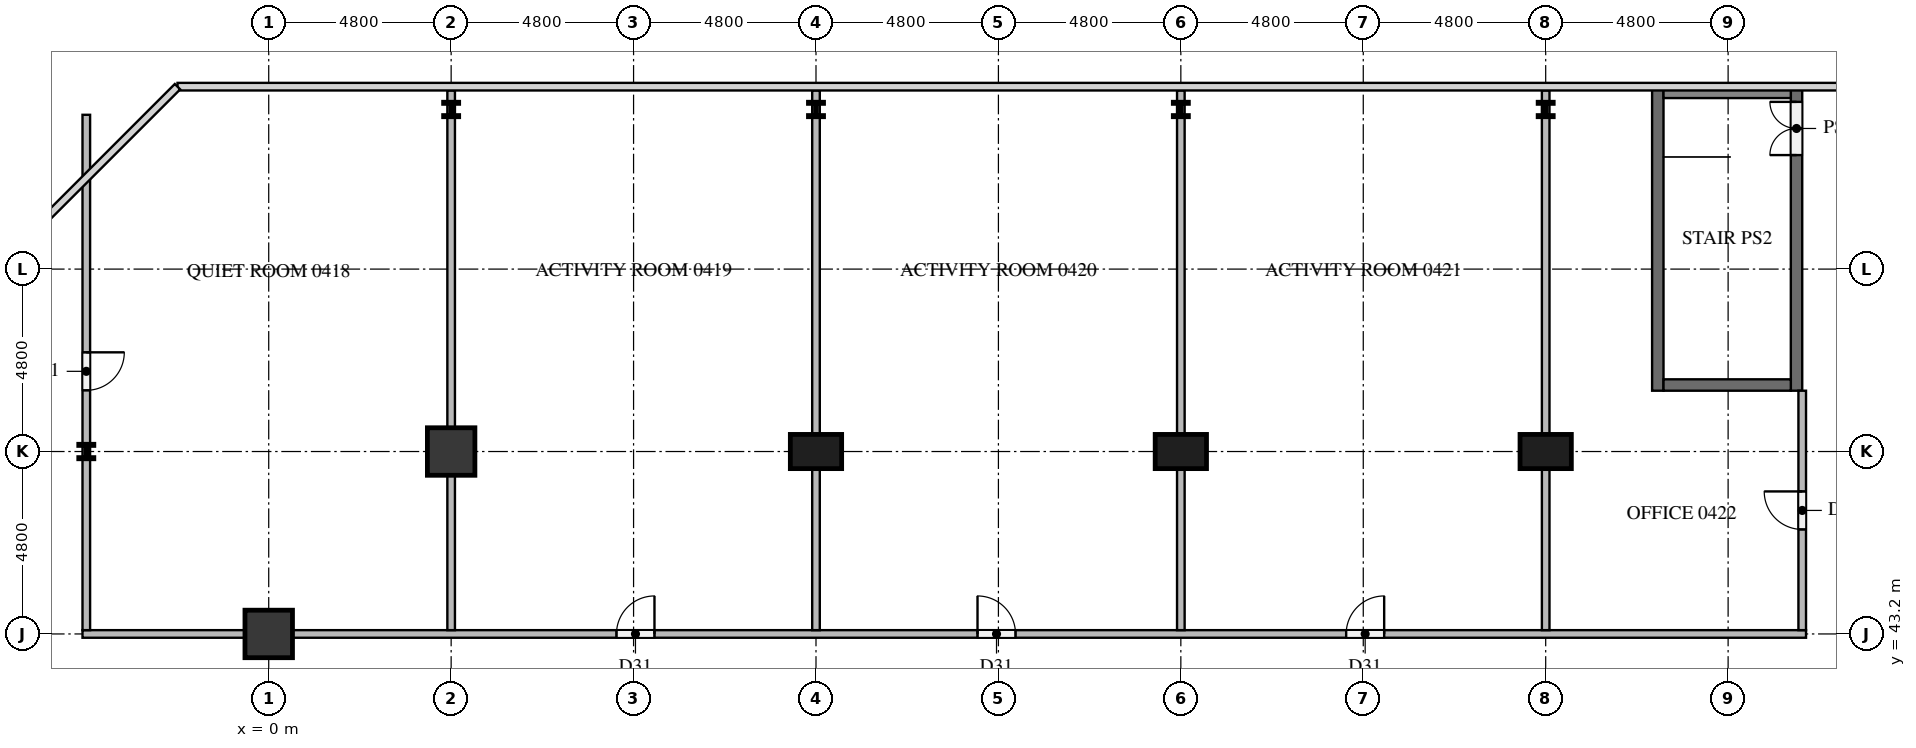
"""IFC4 building model, lengths in metres.
Left out: names, types, materials, properties, quantities, classifications, styles, units other than length and angle.
Written with IfcOpenShell. Run it as: python <this file> out.ifc"""

import sys

from ifc_helpers import new_model, si_unit, direction, frame, frame_2d, origin, origin_2d, place, context, subcontext, project, spatial, rectangle, i_section, extrude, element, fill, save


model = new_model("IFC4")
c1 = context("Model", 3, precision=1e-05, world=origin(), true_north=direction((0.0, 1.0)))
c2 = subcontext(c1, "Body", "Model", "MODEL_VIEW")
j1 = project(units=[si_unit("LENGTHUNIT", "METRE"), si_unit("PLANEANGLEUNIT", "RADIAN")], contexts=[c1])
p1 = place(None, origin())
s1 = spatial("IfcSite", under=j1, at=p1, CompositionType="ELEMENT")
p2 = place(p1, origin())
s2 = spatial("IfcBuilding", under=s1, at=p2, CompositionType="ELEMENT")
p3 = place(p2, frame((0.0, 0.0, 19.5)))
s3 = spatial("IfcBuildingStorey", under=s2, at=p3, CompositionType="ELEMENT", Elevation=19.5)
p4 = place(p3, frame((36.55, 49.6, 0.0), z_axis=(0.0, 0.0, 1.0), x_axis=(0.0, 1.0, 0.0)))
e1 = element("IfcWall", 1, at=p4, inside=s3, PredefinedType="SOLIDWALL", context=c2, shape_type="SweptSolid", body=[
    extrude(rectangle(XDim=8.0, YDim=0.3, at=frame_2d((4.0, 0.0))), origin(), (0.0, 0.0, 1.0), 4.1),
])
p5 = place(p3, frame((40.2, 49.6, 0.0), z_axis=(0.0, 0.0, 1.0), x_axis=(0.0, 1.0, 0.0)))
e2 = element("IfcWall", 2, at=p5, inside=s3, PredefinedType="SOLIDWALL", context=c2, shape_type="SweptSolid", body=[
    extrude(rectangle(XDim=8.0, YDim=0.3, at=frame_2d((4.0, 0.0))), origin(), (0.0, 0.0, 1.0), 4.1),
])
p6 = place(p5, frame((6.2, 0.0, 0.0)))
e3 = element("IfcOpeningElement", 3, at=p6, cuts=e2, PredefinedType="OPENING", context=c2, shape_type="SweptSolid", body=[
    extrude(rectangle(XDim=1.4, YDim=2.1, at=frame_2d((0.7, 1.05))), frame((0.0, 0.16, 0.0), z_axis=(0.0, -1.0, 0.0), x_axis=(1.0, 0.0, 0.0)), (0.0, 0.0, 1.0), 0.32),
])
for number, where, z_axis, x_axis in (
    (4, (36.7, 49.75, 0.0), (0.0, 0.0, 1.0), (1.0, 0.0, 0.0)),
    (5, (36.7, 57.45, 0.0), (0.0, 0.0, 1.0), (1.0, 0.0, 0.0)),
):
    element("IfcWall", number, at=place(p3, frame(where, z_axis=z_axis, x_axis=x_axis)), inside=s3, PredefinedType="SOLIDWALL", context=c2, shape_type="SweptSolid", body=[
        extrude(rectangle(XDim=3.35, YDim=0.3, at=frame_2d((1.675, 0.0))), origin(), (0.0, 0.0, 1.0), 4.1),
    ])
for number, where, z_axis, x_axis in (
    (6, (33.6, 48.0, 0.0), (0.0, 0.0, 1.0), (1.0, 0.0, 0.0)),
    (7, (24.0, 48.0, 0.0), (0.0, 0.0, 1.0), (1.0, 0.0, 0.0)),
    (8, (14.4, 48.0, 0.0), (0.0, 0.0, 1.0), (1.0, 0.0, 0.0)),
):
    element("IfcColumn", number, at=place(p3, frame(where, z_axis=z_axis, x_axis=x_axis)), inside=s3, PredefinedType="COLUMN", context=c2, shape_type="SweptSolid", body=[
        extrude(rectangle(XDim=1.35, YDim=0.9, at=origin_2d()), origin(), (0.0, 0.0, 1.0), 4.1),
    ])
for number, where, z_axis, x_axis in (
    (9, (4.8, 48.0, 0.0), (0.0, 0.0, 1.0), (1.0, 0.0, 0.0)),
    (10, (0.0, 43.2, 0.0), (0.0, 0.0, 1.0), (1.0, 0.0, 0.0)),
):
    element("IfcColumn", number, at=place(p3, frame(where, z_axis=z_axis, x_axis=x_axis)), inside=s3, PredefinedType="COLUMN", context=c2, shape_type="SweptSolid", body=[
        extrude(rectangle(XDim=1.25, YDim=1.25, at=origin_2d()), origin(), (0.0, 0.0, 1.0), 4.1),
    ])
for number, where, z_axis, x_axis in (
    (11, (-4.8, 48.0, 0.0), (0.0, 0.0, 1.0), (1.0, 0.0, 0.0)),
    (12, (4.8, 57.0, 0.0), (0.0, 0.0, 1.0), (1.0, 0.0, 0.0)),
    (13, (14.4, 57.0, 0.0), (0.0, 0.0, 1.0), (1.0, 0.0, 0.0)),
    (14, (24.0, 57.0, 0.0), (0.0, 0.0, 1.0), (1.0, 0.0, 0.0)),
    (15, (33.6, 57.0, 0.0), (0.0, 0.0, 1.0), (1.0, 0.0, 0.0)),
):
    element("IfcColumn", number, at=place(p3, frame(where, z_axis=z_axis, x_axis=x_axis)), inside=s3, PredefinedType="COLUMN", context=c2, shape_type="SweptSolid", body=[
        extrude(i_section(OverallWidth=0.396, OverallDepth=0.381, WebThickness=0.019, FlangeThickness=0.03, at=origin_2d()), origin(), (0.0, 0.0, 1.0), 4.1),
    ])
p7 = place(p3, frame((-4.9, 43.2, 0.0), z_axis=(0.0, 0.0, 1.0), x_axis=(1.0, 0.0, 0.0)))
e16 = element("IfcWall", 16, at=p7, inside=s3, PredefinedType="PARTITIONING", context=c2, shape_type="SweptSolid", body=[
    extrude(rectangle(XDim=45.35, YDim=0.2, at=frame_2d((22.675, 0.0))), origin(), (0.0, 0.0, 1.0), 4.1),
])
p8 = place(p7, frame((14.05, 0.0, 0.0)))
e17 = element("IfcOpeningElement", 17, at=p8, cuts=e16, PredefinedType="OPENING", context=c2, shape_type="SweptSolid", body=[
    extrude(rectangle(XDim=1.0, YDim=2.1, at=frame_2d((0.5, 1.05))), frame((0.0, 0.11, 0.0), z_axis=(0.0, -1.0, 0.0), x_axis=(1.0, 0.0, 0.0)), (0.0, 0.0, 1.0), 0.22),
])
p9 = place(p7, frame((23.55, 0.0, 0.0)))
e18 = element("IfcOpeningElement", 18, at=p9, cuts=e16, PredefinedType="OPENING", context=c2, shape_type="SweptSolid", body=[
    extrude(rectangle(XDim=1.0, YDim=2.1, at=frame_2d((0.5, 1.05))), frame((0.0, 0.11, 0.0), z_axis=(0.0, -1.0, 0.0), x_axis=(1.0, 0.0, 0.0)), (0.0, 0.0, 1.0), 0.22),
])
p10 = place(p7, frame((33.25, 0.0, 0.0)))
e19 = element("IfcOpeningElement", 19, at=p10, cuts=e16, PredefinedType="OPENING", context=c2, shape_type="SweptSolid", body=[
    extrude(rectangle(XDim=1.0, YDim=2.1, at=frame_2d((0.5, 1.05))), frame((0.0, 0.11, 0.0), z_axis=(0.0, -1.0, 0.0), x_axis=(1.0, 0.0, 0.0)), (0.0, 0.0, 1.0), 0.22),
])
p11 = place(p3, frame((-4.8, 56.86, 0.0), z_axis=(0.0, 0.0, 1.0), x_axis=(0.0, -1.0, 0.0)))
e20 = element("IfcWall", 20, at=p11, inside=s3, PredefinedType="PARTITIONING", context=c2, shape_type="SweptSolid", body=[
    extrude(rectangle(XDim=13.56, YDim=0.2, at=frame_2d((6.78, 0.0))), origin(), (0.0, 0.0, 1.0), 4.1),
])
p12 = place(p11, frame((6.25, 0.0, 0.0)))
e21 = element("IfcOpeningElement", 21, at=p12, cuts=e20, PredefinedType="OPENING", context=c2, shape_type="SweptSolid", body=[
    extrude(rectangle(XDim=1.0, YDim=2.1, at=frame_2d((0.5, 1.05))), frame((0.0, 0.11, 0.0), z_axis=(0.0, -1.0, 0.0), x_axis=(1.0, 0.0, 0.0)), (0.0, 0.0, 1.0), 0.22),
])
for number, where, z_axis, x_axis in (
    (22, (4.8, 43.3, 0.0), (0.0, 0.0, 1.0), (0.0, 1.0, 0.0)),
    (23, (14.4, 43.3, 0.0), (0.0, 0.0, 1.0), (0.0, 1.0, 0.0)),
    (24, (24.0, 43.3, 0.0), (0.0, 0.0, 1.0), (0.0, 1.0, 0.0)),
    (25, (33.6, 43.3, 0.0), (0.0, 0.0, 1.0), (0.0, 1.0, 0.0)),
):
    element("IfcWall", number, at=place(p3, frame(where, z_axis=z_axis, x_axis=x_axis)), inside=s3, PredefinedType="PARTITIONING", context=c2, shape_type="SweptSolid", body=[
        extrude(rectangle(XDim=14.2, YDim=0.2, at=frame_2d((7.1, 0.0))), origin(), (0.0, 0.0, 1.0), 4.1),
    ])
p13 = place(p3, frame((40.35, 43.3, 0.0), z_axis=(0.0, 0.0, 1.0), x_axis=(0.0, 1.0, 0.0)))
e26 = element("IfcWall", 26, at=p13, inside=s3, PredefinedType="PARTITIONING", context=c2, shape_type="SweptSolid", body=[
    extrude(rectangle(XDim=6.3, YDim=0.2, at=frame_2d((3.15, 0.0))), origin(), (0.0, 0.0, 1.0), 4.1),
])
p14 = place(p13, frame((2.65, 0.0, 0.0)))
e27 = element("IfcOpeningElement", 27, at=p14, cuts=e26, PredefinedType="OPENING", context=c2, shape_type="SweptSolid", body=[
    extrude(rectangle(XDim=1.0, YDim=2.1, at=frame_2d((0.5, 1.05))), frame((0.0, 0.11, 0.0), z_axis=(0.0, -1.0, 0.0), x_axis=(1.0, 0.0, 0.0)), (0.0, 0.0, 1.0), 0.22),
])
p15 = place(p6, origin())
e28 = element("IfcDoor", 28, at=p15, inside=s3, OperationType="DOUBLE_DOOR_SINGLE_SWING", PredefinedType="DOOR", context=c2, shape_type="SweptSolid", body=[
    extrude(rectangle(XDim=1.4, YDim=2.1, at=frame_2d((0.7, 1.05))), frame((0.0, 0.025, 0.0), z_axis=(0.0, -1.0, 0.0), x_axis=(1.0, 0.0, 0.0)), (0.0, 0.0, 1.0), 0.05),
])
fill(e3, e28)
p16 = place(p12, origin())
e29 = element("IfcDoor", 29, at=p16, inside=s3, OperationType="SINGLE_SWING_LEFT", PredefinedType="DOOR", context=c2, shape_type="SweptSolid", body=[
    extrude(rectangle(XDim=1.0, YDim=2.1, at=frame_2d((0.5, 1.05))), frame((0.0, 0.025, 0.0), z_axis=(0.0, -1.0, 0.0), x_axis=(1.0, 0.0, 0.0)), (0.0, 0.0, 1.0), 0.05),
])
fill(e21, e29)
p17 = place(p8, origin())
e30 = element("IfcDoor", 30, at=p17, inside=s3, OperationType="SINGLE_SWING_RIGHT", PredefinedType="DOOR", context=c2, shape_type="SweptSolid", body=[
    extrude(rectangle(XDim=1.0, YDim=2.1, at=frame_2d((0.5, 1.05))), frame((0.0, 0.025, 0.0), z_axis=(0.0, -1.0, 0.0), x_axis=(1.0, 0.0, 0.0)), (0.0, 0.0, 1.0), 0.05),
])
fill(e17, e30)
p18 = place(p9, origin())
e31 = element("IfcDoor", 31, at=p18, inside=s3, OperationType="SINGLE_SWING_LEFT", PredefinedType="DOOR", context=c2, shape_type="SweptSolid", body=[
    extrude(rectangle(XDim=1.0, YDim=2.1, at=frame_2d((0.5, 1.05))), frame((0.0, 0.025, 0.0), z_axis=(0.0, -1.0, 0.0), x_axis=(1.0, 0.0, 0.0)), (0.0, 0.0, 1.0), 0.05),
])
fill(e18, e31)
p19 = place(p10, origin())
e32 = element("IfcDoor", 32, at=p19, inside=s3, OperationType="SINGLE_SWING_RIGHT", PredefinedType="DOOR", context=c2, shape_type="SweptSolid", body=[
    extrude(rectangle(XDim=1.0, YDim=2.1, at=frame_2d((0.5, 1.05))), frame((0.0, 0.025, 0.0), z_axis=(0.0, -1.0, 0.0), x_axis=(1.0, 0.0, 0.0)), (0.0, 0.0, 1.0), 0.05),
])
fill(e19, e32)
p20 = place(p14, origin())
e33 = element("IfcDoor", 33, at=p20, inside=s3, OperationType="SINGLE_SWING_RIGHT", PredefinedType="DOOR", context=c2, shape_type="SweptSolid", body=[
    extrude(rectangle(XDim=1.0, YDim=2.1, at=frame_2d((0.5, 1.05))), frame((0.0, 0.025, 0.0), z_axis=(0.0, -1.0, 0.0), x_axis=(1.0, 0.0, 0.0)), (0.0, 0.0, 1.0), 0.05),
])
fill(e27, e33)
save(model, sys.argv[1])
